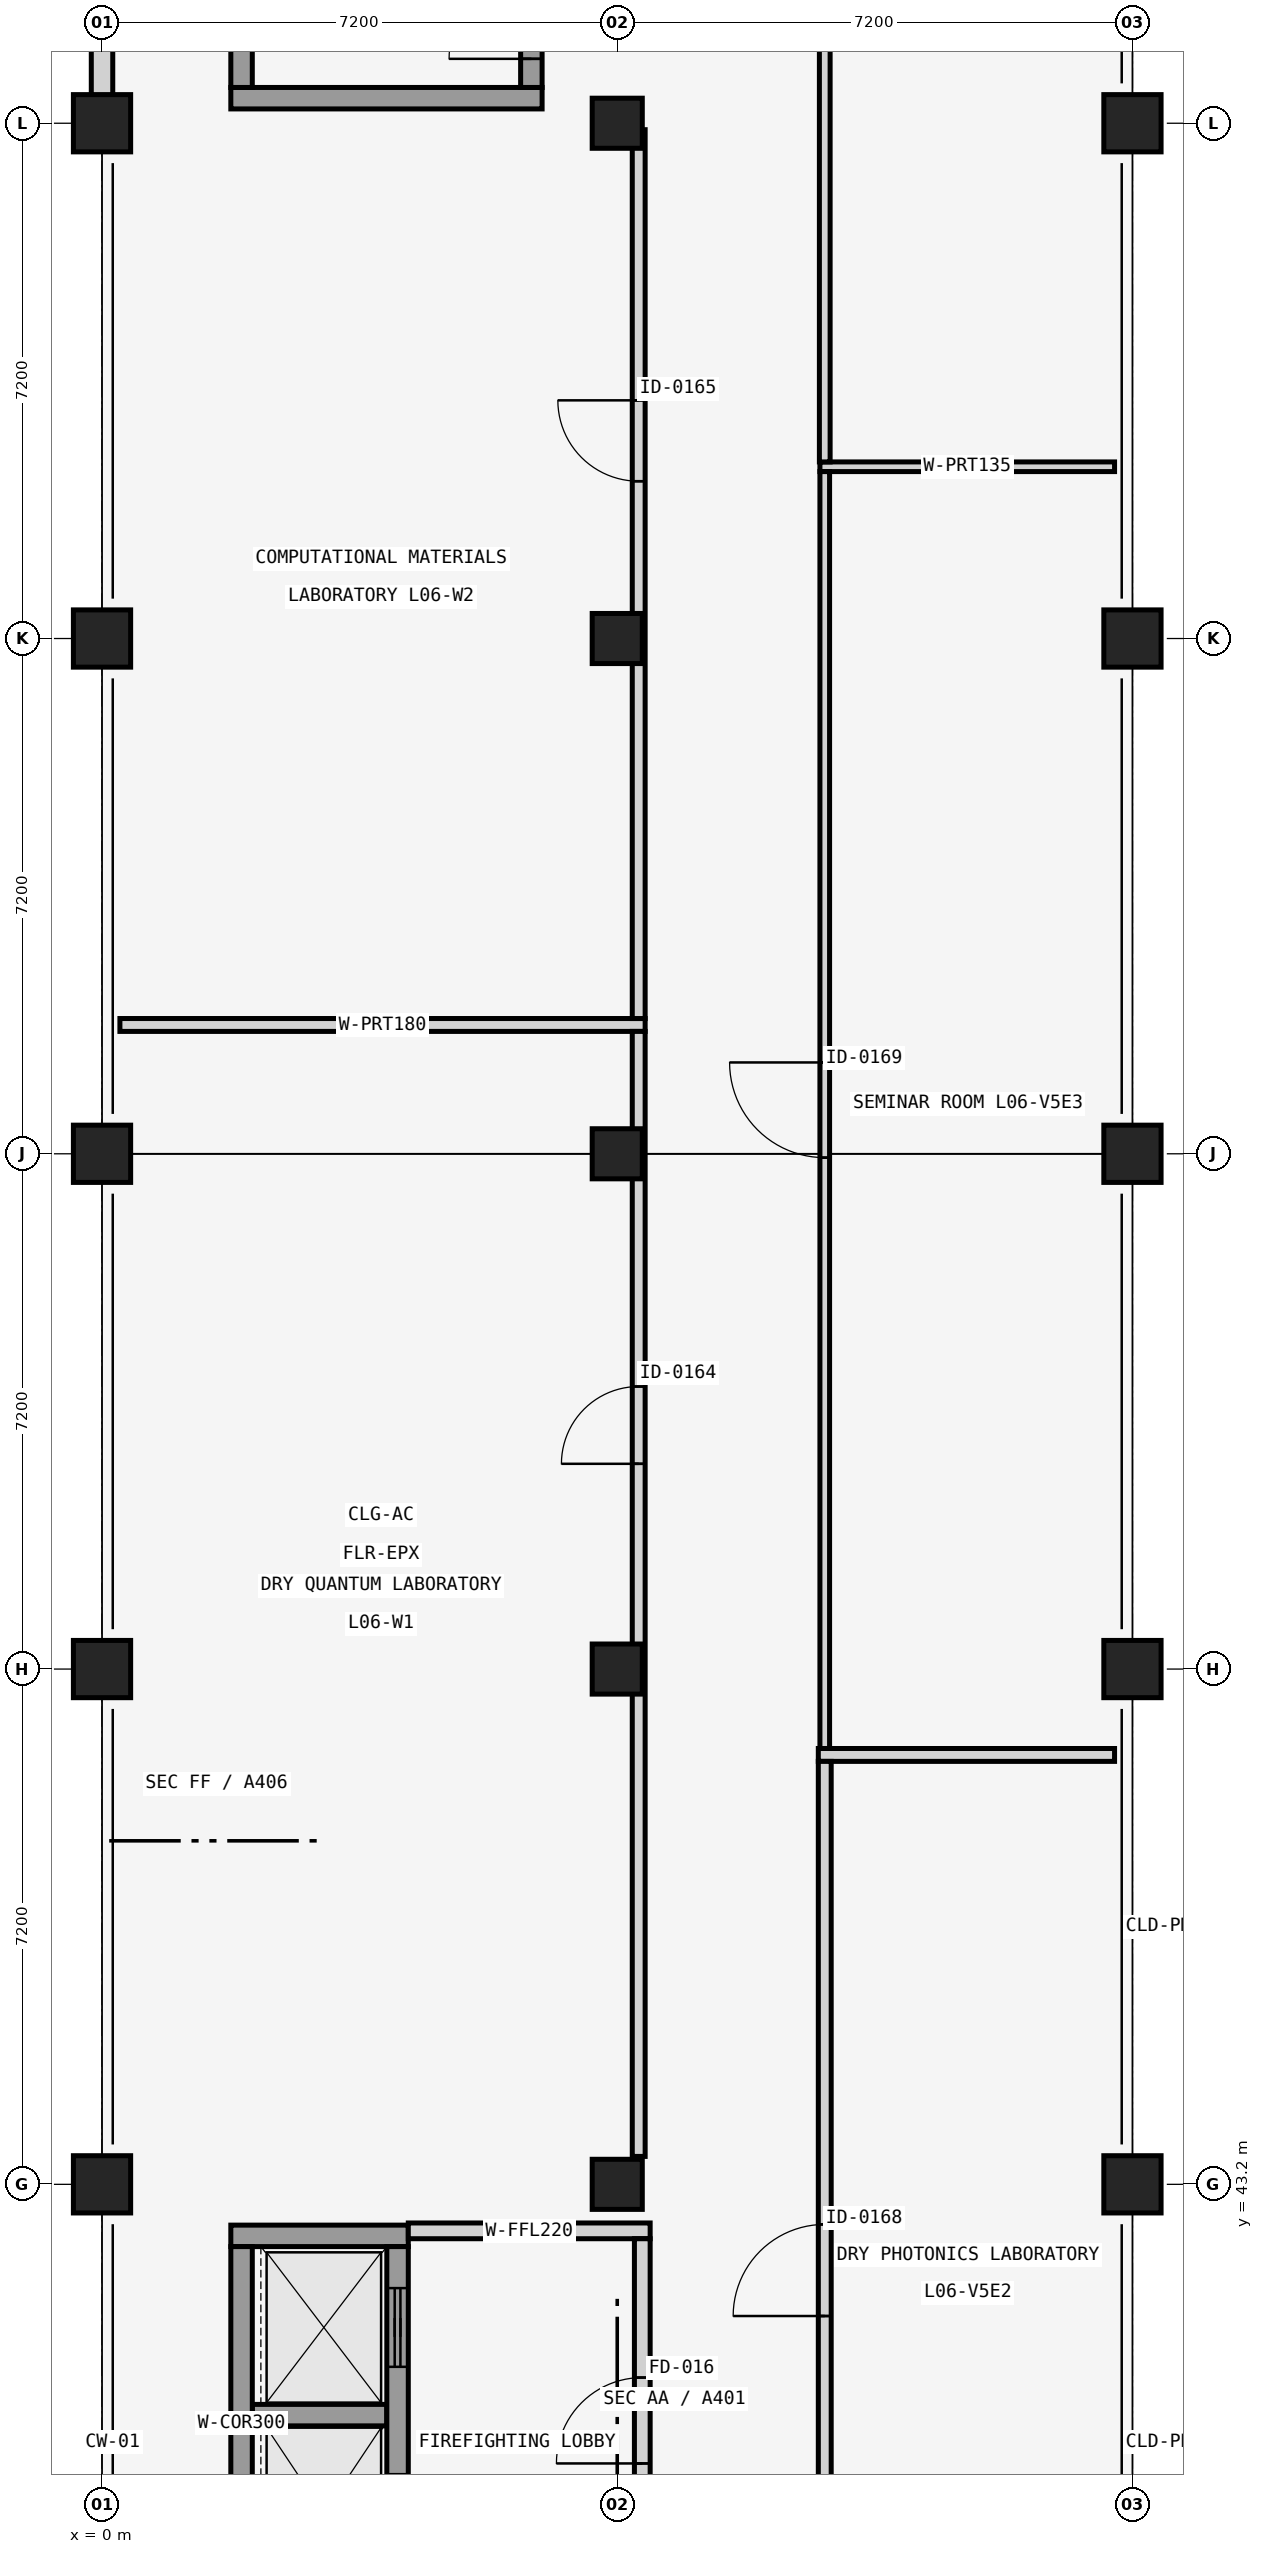
"""IFC4 building model, lengths in metres.
Left out: names, types, materials, properties, quantities, classifications, styles, units other than length and angle.
Written with IfcOpenShell. Run it as: python <this file> out.ifc"""

import sys

from ifc_helpers import new_model, si_unit, direction, frame, frame_2d, origin, origin_2d, place, context, subcontext, project, spatial, rectangle, extrude, element, fill, save


model = new_model("IFC4")
c1 = context("Model", 3, precision=1e-05, world=origin(), true_north=direction((0.0, 1.0)))
c2 = subcontext(c1, "Body", "Model", "MODEL_VIEW")
j1 = project(units=[si_unit("LENGTHUNIT", "METRE"), si_unit("PLANEANGLEUNIT", "RADIAN")], contexts=[c1])
p1 = place(None, origin())
s1 = spatial("IfcSite", under=j1, at=p1, CompositionType="ELEMENT")
p2 = place(p1, origin())
s2 = spatial("IfcBuilding", under=s1, at=p2, CompositionType="ELEMENT")
p3 = place(p2, frame((0.0, 0.0, 25.6)))
s3 = spatial("IfcBuildingStorey", under=s2, at=p3, CompositionType="ELEMENT", Elevation=25.6)
for number, where, z_axis, x_axis in (
    (1, (0.0, 43.2, 0.0), (0.0, 0.0, 1.0), (1.0, 0.0, 0.0)),
    (2, (0.0, 50.4, 0.0), (0.0, 0.0, 1.0), (1.0, 0.0, 0.0)),
    (3, (0.0, 57.6, 0.0), (0.0, 0.0, 1.0), (1.0, 0.0, 0.0)),
    (4, (0.0, 64.8, 0.0), (0.0, 0.0, 1.0), (1.0, 0.0, 0.0)),
    (5, (0.0, 72.0, 0.0), (0.0, 0.0, 1.0), (1.0, 0.0, 0.0)),
):
    element("IfcColumn", number, at=place(p3, frame(where, z_axis=z_axis, x_axis=x_axis)), inside=s3, PredefinedType="COLUMN", context=c2, shape_type="SweptSolid", body=[
        extrude(rectangle(XDim=0.8, YDim=0.8, at=origin_2d()), origin(), (0.0, 0.0, 1.0), 4.16),
    ])
for number, where, z_axis, x_axis in (
    (6, (7.2, 43.2, 0.0), (0.0, 0.0, 1.0), (1.0, 0.0, 0.0)),
    (7, (7.2, 50.4, 0.0), (0.0, 0.0, 1.0), (1.0, 0.0, 0.0)),
    (8, (7.2, 57.6, 0.0), (0.0, 0.0, 1.0), (1.0, 0.0, 0.0)),
    (9, (7.2, 64.8, 0.0), (0.0, 0.0, 1.0), (1.0, 0.0, 0.0)),
    (10, (7.2, 72.0, 0.0), (0.0, 0.0, 1.0), (1.0, 0.0, 0.0)),
):
    element("IfcColumn", number, at=place(p3, frame(where, z_axis=z_axis, x_axis=x_axis)), inside=s3, PredefinedType="COLUMN", context=c2, shape_type="SweptSolid", body=[
        extrude(rectangle(XDim=0.7, YDim=0.7, at=origin_2d()), origin(), (0.0, 0.0, 1.0), 4.16),
    ])
for number, where, z_axis, x_axis in (
    (11, (14.4, 43.2, 0.0), (0.0, 0.0, 1.0), (1.0, 0.0, 0.0)),
    (12, (14.4, 50.4, 0.0), (0.0, 0.0, 1.0), (1.0, 0.0, 0.0)),
    (13, (14.4, 57.6, 0.0), (0.0, 0.0, 1.0), (1.0, 0.0, 0.0)),
    (14, (14.4, 64.8, 0.0), (0.0, 0.0, 1.0), (1.0, 0.0, 0.0)),
    (15, (14.4, 72.0, 0.0), (0.0, 0.0, 1.0), (1.0, 0.0, 0.0)),
):
    element("IfcColumn", number, at=place(p3, frame(where, z_axis=z_axis, x_axis=x_axis)), inside=s3, PredefinedType="COLUMN", context=c2, shape_type="SweptSolid", body=[
        extrude(rectangle(XDim=0.8, YDim=0.8, at=origin_2d()), origin(), (0.0, 0.0, 1.0), 4.16),
    ])
p4 = place(p3, frame((0.0, 72.39, 0.0), z_axis=(0.0, 0.0, 1.0), x_axis=(0.0, 1.0, 0.0)))
e16 = element("IfcWall", 16, at=p4, inside=s3, PredefinedType="SOLIDWALL", context=c2, shape_type="SweptSolid", body=[
    extrude(rectangle(XDim=6.42, YDim=0.3, at=frame_2d((3.21, 0.0))), origin(), (0.0, 0.0, 1.0), 3.21),
])
p5 = place(p4, frame((2.985, 0.0, 0.65)))
e17 = element("IfcOpeningElement", 17, at=p5, cuts=e16, PredefinedType="OPENING", context=c2, shape_type="SweptSolid", body=[
    extrude(rectangle(XDim=0.45, YDim=2.4, at=frame_2d((0.225, 1.2))), frame((0.0, 0.16, 0.0), z_axis=(0.0, -1.0, 0.0), x_axis=(1.0, 0.0, 0.0)), (0.0, 0.0, 1.0), 0.32),
])
p6 = place(p3, frame((1.8, 42.48, 0.0), z_axis=(0.0, 0.0, 1.0), x_axis=(1.0, 0.0, 0.0)))
e18 = element("IfcWall", 18, at=p6, inside=s3, PredefinedType="SHEAR", context=c2, shape_type="SweptSolid", body=[
    extrude(rectangle(XDim=2.48, YDim=0.3, at=frame_2d((1.24, 0.0))), origin(), (0.0, 0.0, 1.0), 3.81),
])
p7 = place(p3, frame((2.1, 39.975, 0.0), z_axis=(0.0, 0.0, 1.0), x_axis=(1.0, 0.0, 0.0)))
e19 = element("IfcWall", 19, at=p7, inside=s3, PredefinedType="SHEAR", context=c2, shape_type="SweptSolid", body=[
    extrude(rectangle(XDim=1.88, YDim=0.3, at=frame_2d((0.94, 0.0))), origin(), (0.0, 0.0, 1.0), 3.81),
])
p8 = place(p3, frame((1.95, 37.4, 0.0), z_axis=(0.0, 0.0, 1.0), x_axis=(0.0, 1.0, 0.0)))
e20 = element("IfcWall", 20, at=p8, inside=s3, PredefinedType="SHEAR", context=c2, shape_type="SweptSolid", body=[
    extrude(rectangle(XDim=4.93, YDim=0.3, at=frame_2d((2.465, 0.0))), origin(), (0.0, 0.0, 1.0), 3.81),
])
p9 = place(p3, frame((4.13, 37.4, 0.0), z_axis=(0.0, 0.0, 1.0), x_axis=(0.0, 1.0, 0.0)))
e21 = element("IfcWall", 21, at=p9, inside=s3, PredefinedType="SHEAR", context=c2, shape_type="SweptSolid", body=[
    extrude(rectangle(XDim=4.93, YDim=0.3, at=frame_2d((2.465, 0.0))), origin(), (0.0, 0.0, 1.0), 3.81),
])
p10 = place(p9, frame((0.65, 0.0, 0.0)))
e22 = element("IfcOpeningElement", 22, at=p10, cuts=e21, PredefinedType="OPENING", context=c2, shape_type="SweptSolid", body=[
    extrude(rectangle(XDim=1.1, YDim=2.2, at=frame_2d((0.55, 1.1))), frame((0.0, 0.16, 0.0), z_axis=(0.0, -1.0, 0.0), x_axis=(1.0, 0.0, 0.0)), (0.0, 0.0, 1.0), 0.32),
])
p11 = place(p9, frame((3.25, 0.0, 0.0)))
e23 = element("IfcOpeningElement", 23, at=p11, cuts=e21, PredefinedType="OPENING", context=c2, shape_type="SweptSolid", body=[
    extrude(rectangle(XDim=1.1, YDim=2.2, at=frame_2d((0.55, 1.1))), frame((0.0, 0.16, 0.0), z_axis=(0.0, -1.0, 0.0), x_axis=(1.0, 0.0, 0.0)), (0.0, 0.0, 1.0), 0.32),
])
p12 = place(p3, frame((4.28, 42.55, 0.0), z_axis=(0.0, 0.0, 1.0), x_axis=(1.0, 0.0, 0.0)))
e24 = element("IfcWall", 24, at=p12, inside=s3, PredefinedType="SOLIDWALL", context=c2, shape_type="SweptSolid", body=[
    extrude(rectangle(XDim=3.38, YDim=0.22, at=frame_2d((1.69, 0.0))), origin(), (0.0, 0.0, 1.0), 3.01),
])
p13 = place(p3, frame((7.55, 37.36, 0.0), z_axis=(0.0, 0.0, 1.0), x_axis=(0.0, 1.0, 0.0)))
e25 = element("IfcWall", 25, at=p13, inside=s3, PredefinedType="SOLIDWALL", context=c2, shape_type="SweptSolid", body=[
    extrude(rectangle(XDim=5.08, YDim=0.22, at=frame_2d((2.54, 0.0))), origin(), (0.0, 0.0, 1.0), 3.51),
])
p14 = place(p13, frame((1.94, 0.0, 0.0)))
e26 = element("IfcOpeningElement", 26, at=p14, cuts=e25, PredefinedType="OPENING", context=c2, shape_type="SweptSolid", body=[
    extrude(rectangle(XDim=1.2, YDim=2.2, at=frame_2d((0.6, 1.1))), frame((0.0, 0.12, 0.0), z_axis=(0.0, -1.0, 0.0), x_axis=(1.0, 0.0, 0.0)), (0.0, 0.0, 1.0), 0.24),
])
p15 = place(p3, frame((1.8, 72.35, 0.0), z_axis=(0.0, 0.0, 1.0), x_axis=(1.0, 0.0, 0.0)))
e27 = element("IfcWall", 27, at=p15, inside=s3, PredefinedType="SHEAR", context=c2, shape_type="SweptSolid", body=[
    extrude(rectangle(XDim=4.35, YDim=0.3, at=frame_2d((2.175, 0.0))), origin(), (0.0, 0.0, 1.0), 3.81),
])
p16 = place(p3, frame((1.95, 72.5, 0.0), z_axis=(0.0, 0.0, 1.0), x_axis=(0.0, 1.0, 0.0)))
e28 = element("IfcWall", 28, at=p16, inside=s3, PredefinedType="SHEAR", context=c2, shape_type="SweptSolid", body=[
    extrude(rectangle(XDim=7.8, YDim=0.3, at=frame_2d((3.9, 0.0))), origin(), (0.0, 0.0, 1.0), 3.81),
])
p17 = place(p3, frame((6.0, 72.5, 0.0), z_axis=(0.0, 0.0, 1.0), x_axis=(0.0, 1.0, 0.0)))
e29 = element("IfcWall", 29, at=p17, inside=s3, PredefinedType="SHEAR", context=c2, shape_type="SweptSolid", body=[
    extrude(rectangle(XDim=7.8, YDim=0.3, at=frame_2d((3.9, 0.0))), origin(), (0.0, 0.0, 1.0), 3.81),
])
p18 = place(p17, frame((0.4, 0.0, 0.0)))
e30 = element("IfcOpeningElement", 30, at=p18, cuts=e29, PredefinedType="OPENING", context=c2, shape_type="SweptSolid", body=[
    extrude(rectangle(XDim=1.15, YDim=2.2, at=frame_2d((0.575, 1.1))), frame((0.0, 0.16, 0.0), z_axis=(0.0, -1.0, 0.0), x_axis=(1.0, 0.0, 0.0)), (0.0, 0.0, 1.0), 0.32),
])
p19 = place(p3, frame((0.25, 59.4, 0.0), z_axis=(0.0, 0.0, 1.0), x_axis=(1.0, 0.0, 0.0)))
e31 = element("IfcWall", 31, at=p19, inside=s3, PredefinedType="PARTITIONING", context=c2, shape_type="SweptSolid", body=[
    extrude(rectangle(XDim=7.34, YDim=0.18, at=frame_2d((3.67, 0.0))), origin(), (0.0, 0.0, 1.0), 3.21),
])
p20 = place(p3, frame((7.5, 43.59, 0.0), z_axis=(0.0, 0.0, 1.0), x_axis=(0.0, 1.0, 0.0)))
e32 = element("IfcWall", 32, at=p20, inside=s3, PredefinedType="PARTITIONING", context=c2, shape_type="SweptSolid", body=[
    extrude(rectangle(XDim=15.72, YDim=0.18, at=frame_2d((7.86, 0.0))), origin(), (0.0, 0.0, 1.0), 3.21),
])
p21 = place(p20, frame((9.678, 0.0, 0.0)))
e33 = element("IfcOpeningElement", 33, at=p21, cuts=e32, PredefinedType="OPENING", context=c2, shape_type="SweptSolid", body=[
    extrude(rectangle(XDim=1.08, YDim=2.08, at=frame_2d((0.54, 1.04))), frame((0.0, 0.1, 0.0), z_axis=(0.0, -1.0, 0.0), x_axis=(1.0, 0.0, 0.0)), (0.0, 0.0, 1.0), 0.2),
])
p22 = place(p3, frame((7.5, 59.49, 0.0), z_axis=(0.0, 0.0, 1.0), x_axis=(0.0, 1.0, 0.0)))
e34 = element("IfcWall", 34, at=p22, inside=s3, PredefinedType="PARTITIONING", context=c2, shape_type="SweptSolid", body=[
    extrude(rectangle(XDim=12.42, YDim=0.18, at=frame_2d((6.21, 0.0))), origin(), (0.0, 0.0, 1.0), 3.21),
])
p23 = place(p22, frame((7.508, 0.0, 0.0)))
e35 = element("IfcOpeningElement", 35, at=p23, cuts=e34, PredefinedType="OPENING", context=c2, shape_type="SweptSolid", body=[
    extrude(rectangle(XDim=1.13, YDim=2.08, at=frame_2d((0.565, 1.04))), frame((0.0, 0.1, 0.0), z_axis=(0.0, -1.0, 0.0), x_axis=(1.0, 0.0, 0.0)), (0.0, 0.0, 1.0), 0.2),
])
p24 = place(p3, frame((10.01, 49.2, 0.0), z_axis=(0.0, 0.0, 1.0), x_axis=(1.0, 0.0, 0.0)))
e36 = element("IfcWall", 36, at=p24, inside=s3, PredefinedType="PARTITIONING", context=c2, shape_type="SweptSolid", body=[
    extrude(rectangle(XDim=4.14, YDim=0.18, at=frame_2d((2.07, 0.0))), origin(), (0.0, 0.0, 1.0), 3.81),
])
p25 = place(p3, frame((10.1, 34.89, 0.0), z_axis=(0.0, 0.0, 1.0), x_axis=(0.0, 1.0, 0.0)))
e37 = element("IfcWall", 37, at=p25, inside=s3, PredefinedType="PARTITIONING", context=c2, shape_type="SweptSolid", body=[
    extrude(rectangle(XDim=14.22, YDim=0.18, at=frame_2d((7.11, 0.0))), origin(), (0.0, 0.0, 1.0), 3.21),
])
p26 = place(p25, frame((6.47, 0.0, 0.0)))
e38 = element("IfcOpeningElement", 38, at=p26, cuts=e37, PredefinedType="OPENING", context=c2, shape_type="SweptSolid", body=[
    extrude(rectangle(XDim=1.28, YDim=2.12, at=frame_2d((0.64, 1.06))), frame((0.0, 0.1, 0.0), z_axis=(0.0, -1.0, 0.0), x_axis=(1.0, 0.0, 0.0)), (0.0, 0.0, 1.0), 0.2),
])
p27 = place(p3, frame((10.032, 67.2, 0.0), z_axis=(0.0, 0.0, 1.0), x_axis=(1.0, 0.0, 0.0)))
e39 = element("IfcWall", 39, at=p27, inside=s3, PredefinedType="PARTITIONING", context=c2, shape_type="SweptSolid", body=[
    extrude(rectangle(XDim=4.117, YDim=0.135, at=frame_2d((2.059, 0.0))), origin(), (0.0, 0.0, 1.0), 3.21),
])
p28 = place(p3, frame((10.1, 49.29, 0.0), z_axis=(0.0, 0.0, 1.0), x_axis=(0.0, 1.0, 0.0)))
e40 = element("IfcWall", 40, at=p28, inside=s3, PredefinedType="PARTITIONING", context=c2, shape_type="SweptSolid", body=[
    extrude(rectangle(XDim=17.843, YDim=0.135, at=frame_2d((8.921, 0.0))), origin(), (0.0, 0.0, 1.0), 3.21),
])
p29 = place(p28, frame((8.256, 0.0, 0.0)))
e41 = element("IfcOpeningElement", 41, at=p29, cuts=e40, PredefinedType="OPENING", context=c2, shape_type="SweptSolid", body=[
    extrude(rectangle(XDim=1.33, YDim=2.12, at=frame_2d((0.665, 1.06))), frame((0.0, 0.078, 0.0), z_axis=(0.0, -1.0, 0.0), x_axis=(1.0, 0.0, 0.0)), (0.0, 0.0, 1.0), 0.155),
])
p30 = place(p3, frame((10.1, 67.268, 0.0), z_axis=(0.0, 0.0, 1.0), x_axis=(0.0, 1.0, 0.0)))
e42 = element("IfcWall", 42, at=p30, inside=s3, PredefinedType="PARTITIONING", context=c2, shape_type="SweptSolid", body=[
    extrude(rectangle(XDim=18.732, YDim=0.15, at=frame_2d((9.366, 0.0))), origin(), (0.0, 0.0, 1.0), 3.21),
])
p31 = place(p30, frame((8.676, 0.0, 0.0)))
e43 = element("IfcOpeningElement", 43, at=p31, cuts=e42, PredefinedType="OPENING", context=c2, shape_type="SweptSolid", body=[
    extrude(rectangle(XDim=1.38, YDim=2.12, at=frame_2d((0.69, 1.06))), frame((0.0, 0.085, 0.0), z_axis=(0.0, -1.0, 0.0), x_axis=(1.0, 0.0, 0.0)), (0.0, 0.0, 1.0), 0.17),
])
p32 = place(p11, origin())
e44 = element("IfcDoor", 44, at=p32, inside=s3, OperationType="SLIDING_TO_LEFT", PredefinedType="DOOR", context=c2, shape_type="SweptSolid", body=[
    extrude(rectangle(XDim=1.1, YDim=2.2, at=frame_2d((0.55, 1.1))), frame((0.0, 0.025, 0.0), z_axis=(0.0, -1.0, 0.0), x_axis=(1.0, 0.0, 0.0)), (0.0, 0.0, 1.0), 0.05),
])
fill(e23, e44)
p33 = place(p14, origin())
e45 = element("IfcDoor", 45, at=p33, inside=s3, OperationType="SINGLE_SWING_LEFT", PredefinedType="DOOR", context=c2, shape_type="SweptSolid", body=[
    extrude(rectangle(XDim=1.2, YDim=2.2, at=frame_2d((0.6, 1.1))), frame((0.0, 0.025, 0.0), z_axis=(0.0, -1.0, 0.0), x_axis=(1.0, 0.0, 0.0)), (0.0, 0.0, 1.0), 0.05),
])
fill(e26, e45)
p34 = place(p18, origin())
e46 = element("IfcDoor", 46, at=p34, inside=s3, OperationType="SINGLE_SWING_LEFT", PredefinedType="DOOR", context=c2, shape_type="SweptSolid", body=[
    extrude(rectangle(XDim=1.15, YDim=2.2, at=frame_2d((0.575, 1.1))), frame((0.0, 0.025, 0.0), z_axis=(0.0, -1.0, 0.0), x_axis=(1.0, 0.0, 0.0)), (0.0, 0.0, 1.0), 0.05),
])
fill(e30, e46)
p35 = place(p21, origin())
e47 = element("IfcDoor", 47, at=p35, inside=s3, OperationType="SINGLE_SWING_LEFT", PredefinedType="DOOR", context=c2, shape_type="SweptSolid", body=[
    extrude(rectangle(XDim=1.08, YDim=2.08, at=frame_2d((0.54, 1.04))), frame((0.0, 0.025, 0.0), z_axis=(0.0, -1.0, 0.0), x_axis=(1.0, 0.0, 0.0)), (0.0, 0.0, 1.0), 0.05),
])
fill(e33, e47)
p36 = place(p23, origin())
e48 = element("IfcDoor", 48, at=p36, inside=s3, OperationType="SINGLE_SWING_RIGHT", PredefinedType="DOOR", context=c2, shape_type="SweptSolid", body=[
    extrude(rectangle(XDim=1.13, YDim=2.08, at=frame_2d((0.565, 1.04))), frame((0.0, 0.025, 0.0), z_axis=(0.0, -1.0, 0.0), x_axis=(1.0, 0.0, 0.0)), (0.0, 0.0, 1.0), 0.05),
])
fill(e35, e48)
p37 = place(p26, origin())
e49 = element("IfcDoor", 49, at=p37, inside=s3, OperationType="SINGLE_SWING_LEFT", PredefinedType="DOOR", context=c2, shape_type="SweptSolid", body=[
    extrude(rectangle(XDim=1.28, YDim=2.12, at=frame_2d((0.64, 1.06))), frame((0.0, 0.025, 0.0), z_axis=(0.0, -1.0, 0.0), x_axis=(1.0, 0.0, 0.0)), (0.0, 0.0, 1.0), 0.05),
])
fill(e38, e49)
p38 = place(p29, origin())
e50 = element("IfcDoor", 50, at=p38, inside=s3, OperationType="SINGLE_SWING_RIGHT", PredefinedType="DOOR", context=c2, shape_type="SweptSolid", body=[
    extrude(rectangle(XDim=1.33, YDim=2.12, at=frame_2d((0.665, 1.06))), frame((0.0, 0.025, 0.0), z_axis=(0.0, -1.0, 0.0), x_axis=(1.0, 0.0, 0.0)), (0.0, 0.0, 1.0), 0.05),
])
fill(e41, e50)
save(model, sys.argv[1])
